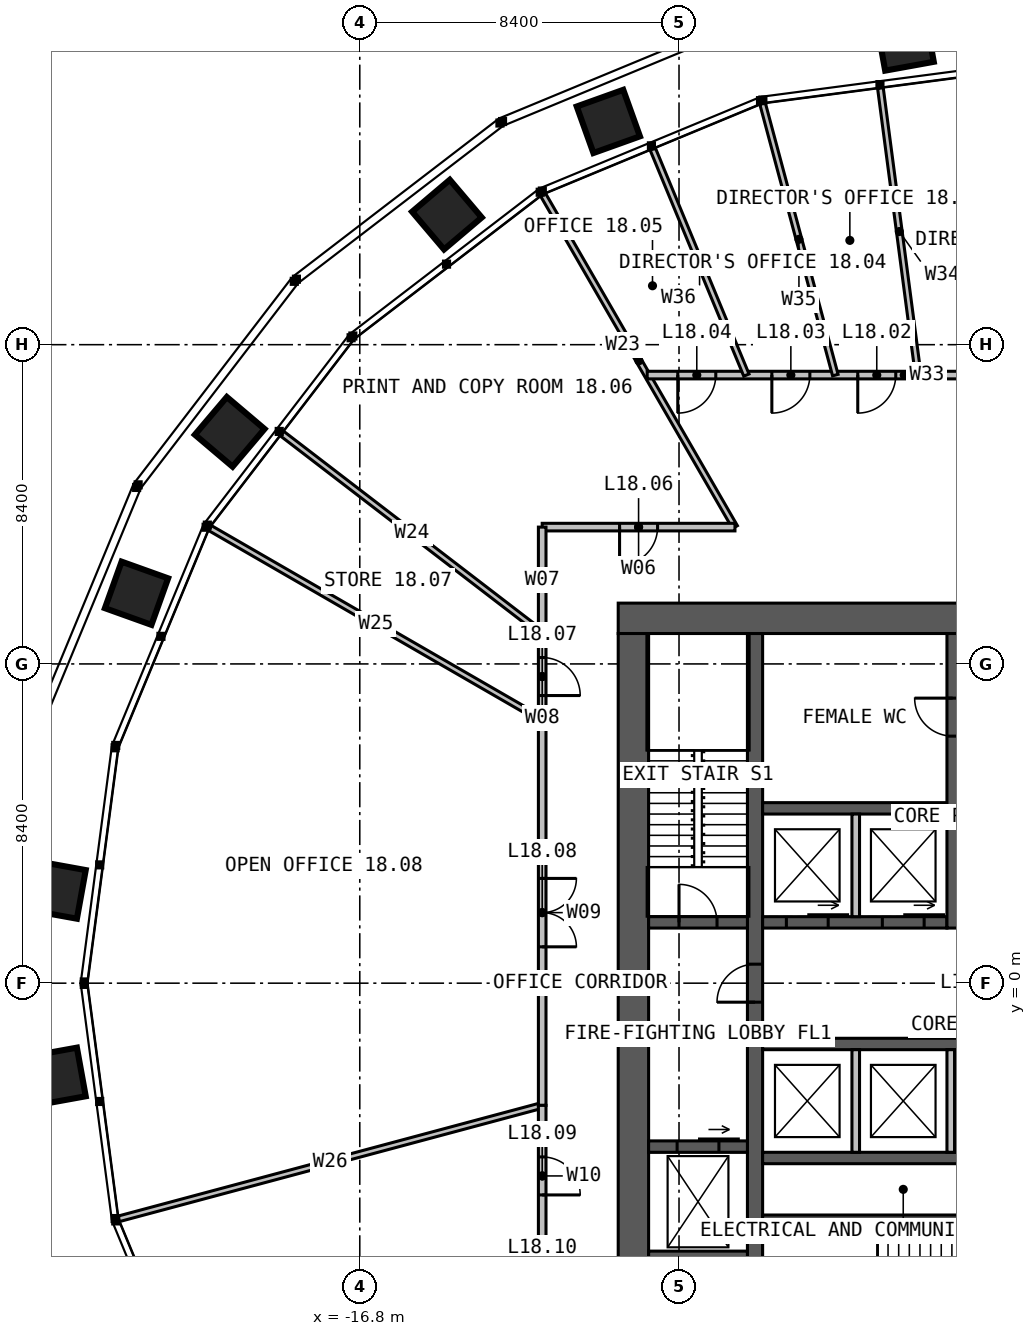
"""IFC4 building model, lengths in metres.
Left out: names, types, materials, properties, quantities, classifications, styles, units other than length and angle.
Written with IfcOpenShell. Run it as: python <this file> out.ifc"""

import sys

from ifc_helpers import new_model, si_unit, direction, frame, frame_2d, origin, place, context, subcontext, project, spatial, rectangle, extrude, element, fill, save


model = new_model("IFC4")
c1 = context("Model", 3, precision=1e-05, world=origin(), true_north=direction((0.0, 1.0)))
c2 = subcontext(c1, "Body", "Model", "MODEL_VIEW")
j1 = project(units=[si_unit("LENGTHUNIT", "METRE"), si_unit("PLANEANGLEUNIT", "RADIAN")], contexts=[c1])
p1 = place(None, origin())
s1 = spatial("IfcSite", under=j1, at=p1, CompositionType="ELEMENT")
p2 = place(p1, origin())
s2 = spatial("IfcBuilding", under=s1, at=p2, CompositionType="ELEMENT")
p3 = place(p2, frame((0.0, 0.0, 77.0)))
s3 = spatial("IfcBuildingStorey", under=s2, at=p3, CompositionType="ELEMENT", Elevation=77.0)
p4 = place(p3, frame((-10.0, 9.6, 0.0), z_axis=(0.0, 0.0, 1.0), x_axis=(1.0, 0.0, 0.0)))
e1 = element("IfcWall", 1, at=p4, inside=s3, PredefinedType="SOLIDWALL", context=c2, shape_type="SweptSolid", body=[
    extrude(rectangle(XDim=20.0, YDim=0.8, at=frame_2d((10.0, 0.0))), origin(), (0.0, 0.0, 1.0), 4.0),
])
p5 = place(p4, frame((9.4, 0.0, 0.0)))
e2 = element("IfcOpeningElement", 2, at=p5, cuts=e1, PredefinedType="OPENING", context=c2, shape_type="SweptSolid", body=[
    extrude(rectangle(XDim=1.2, YDim=2.2, at=frame_2d((0.6, 1.1))), frame((0.0, 0.41, 0.0), z_axis=(0.0, -1.0, 0.0), x_axis=(1.0, 0.0, 0.0)), (0.0, 0.0, 1.0), 0.82),
])
p6 = place(p3, frame((-9.6, 9.2, 0.0), z_axis=(0.0, 0.0, 1.0), x_axis=(0.0, -1.0, 0.0)))
e3 = element("IfcWall", 3, at=p6, inside=s3, PredefinedType="SOLIDWALL", context=c2, shape_type="SweptSolid", body=[
    extrude(rectangle(XDim=18.4, YDim=0.8, at=frame_2d((9.2, 0.0))), origin(), (0.0, 0.0, 1.0), 4.0),
])
p7 = place(p3, frame((-6.4, -9.2, 0.0), z_axis=(0.0, 0.0, 1.0), x_axis=(0.0, 1.0, 0.0)))
e4 = element("IfcWall", 4, at=p7, inside=s3, PredefinedType="SOLIDWALL", context=c2, shape_type="SweptSolid", body=[
    extrude(rectangle(XDim=18.4, YDim=0.4, at=frame_2d((9.2, 0.0))), origin(), (0.0, 0.0, 1.0), 4.0),
])
p8 = place(p7, frame((8.7, 0.0, 0.0)))
e5 = element("IfcOpeningElement", 5, at=p8, cuts=e4, PredefinedType="OPENING", context=c2, shape_type="SweptSolid", body=[
    extrude(rectangle(XDim=1.0, YDim=2.2, at=frame_2d((0.5, 1.1))), frame((0.0, 0.21, 0.0), z_axis=(0.0, -1.0, 0.0), x_axis=(1.0, 0.0, 0.0)), (0.0, 0.0, 1.0), 0.42),
])
p9 = place(p3, frame((-6.2, 1.6, 0.0), z_axis=(0.0, 0.0, 1.0), x_axis=(1.0, 0.0, 0.0)))
e6 = element("IfcWall", 6, at=p9, inside=s3, PredefinedType="SOLIDWALL", context=c2, shape_type="SweptSolid", body=[
    extrude(rectangle(XDim=4.85, YDim=0.3, at=frame_2d((2.425, 0.0))), origin(), (0.0, 0.0, 1.0), 4.0),
])
p10 = place(p9, frame((0.625, 0.0, 0.0)))
e7 = element("IfcOpeningElement", 7, at=p10, cuts=e6, PredefinedType="OPENING", context=c2, shape_type="SweptSolid", body=[
    extrude(rectangle(XDim=1.1, YDim=2.2, at=frame_2d((0.55, 1.1))), frame((0.0, 0.16, 0.0), z_axis=(0.0, -1.0, 0.0), x_axis=(1.0, 0.0, 0.0)), (0.0, 0.0, 1.0), 0.32),
])
p11 = place(p9, frame((3.15, 0.0, 0.0)))
e8 = element("IfcOpeningElement", 8, at=p11, cuts=e6, PredefinedType="OPENING", context=c2, shape_type="SweptSolid", body=[
    extrude(rectangle(XDim=1.1, YDim=2.2, at=frame_2d((0.55, 1.1))), frame((0.0, 0.16, 0.0), z_axis=(0.0, -1.0, 0.0), x_axis=(1.0, 0.0, 0.0)), (0.0, 0.0, 1.0), 0.32),
])
p12 = place(p3, frame((-6.2, 4.6, 0.0), z_axis=(0.0, 0.0, 1.0), x_axis=(1.0, 0.0, 0.0)))
e9 = element("IfcWall", 9, at=p12, inside=s3, PredefinedType="SOLIDWALL", context=c2, shape_type="SweptSolid", body=[
    extrude(rectangle(XDim=4.85, YDim=0.3, at=frame_2d((2.425, 0.0))), origin(), (0.0, 0.0, 1.0), 4.0),
])
p13 = place(p3, frame((-1.2, 1.45, 0.0), z_axis=(0.0, 0.0, 1.0), x_axis=(0.0, 1.0, 0.0)))
e10 = element("IfcWall", 10, at=p13, inside=s3, PredefinedType="SOLIDWALL", context=c2, shape_type="SweptSolid", body=[
    extrude(rectangle(XDim=7.75, YDim=0.3, at=frame_2d((3.875, 0.0))), origin(), (0.0, 0.0, 1.0), 4.0),
])
p14 = place(p13, frame((5.05, 0.0, 0.0)))
e11 = element("IfcOpeningElement", 11, at=p14, cuts=e10, PredefinedType="OPENING", context=c2, shape_type="SweptSolid", body=[
    extrude(rectangle(XDim=1.0, YDim=2.2, at=frame_2d((0.5, 1.1))), frame((0.0, 0.16, 0.0), z_axis=(0.0, -1.0, 0.0), x_axis=(1.0, 0.0, 0.0)), (0.0, 0.0, 1.0), 0.32),
])
for number, where, z_axis, x_axis in (
    (12, (-6.2, -1.6, 0.0), (0.0, 0.0, 1.0), (1.0, 0.0, 0.0)),
    (13, (-6.2, -4.6, 0.0), (0.0, 0.0, 1.0), (1.0, 0.0, 0.0)),
):
    element("IfcWall", number, at=place(p3, frame(where, z_axis=z_axis, x_axis=x_axis)), inside=s3, PredefinedType="SOLIDWALL", context=c2, shape_type="SweptSolid", body=[
        extrude(rectangle(XDim=7.4, YDim=0.3, at=frame_2d((3.7, 0.0))), origin(), (0.0, 0.0, 1.0), 4.0),
    ])
p15 = place(p3, frame((-6.2, -6.2, 0.0), z_axis=(0.0, 0.0, 1.0), x_axis=(1.0, 0.0, 0.0)))
e14 = element("IfcWall", 14, at=p15, inside=s3, PredefinedType="SOLIDWALL", context=c2, shape_type="SweptSolid", body=[
    extrude(rectangle(XDim=7.4, YDim=0.2, at=frame_2d((3.7, 0.0))), origin(), (0.0, 0.0, 1.0), 4.0),
])
p16 = place(p3, frame((-9.2, 1.6, 0.0), z_axis=(0.0, 0.0, 1.0), x_axis=(1.0, 0.0, 0.0)))
e15 = element("IfcWall", 15, at=p16, inside=s3, PredefinedType="SOLIDWALL", context=c2, shape_type="SweptSolid", body=[
    extrude(rectangle(XDim=2.6, YDim=0.3, at=frame_2d((1.3, 0.0))), origin(), (0.0, 0.0, 1.0), 4.0),
])
p17 = place(p16, frame((0.8, 0.0, 0.0)))
e16 = element("IfcOpeningElement", 16, at=p17, cuts=e15, PredefinedType="OPENING", context=c2, shape_type="SweptSolid", body=[
    extrude(rectangle(XDim=1.0, YDim=2.2, at=frame_2d((0.5, 1.1))), frame((0.0, 0.16, 0.0), z_axis=(0.0, -1.0, 0.0), x_axis=(1.0, 0.0, 0.0)), (0.0, 0.0, 1.0), 0.32),
])
p18 = place(p3, frame((-9.2, -4.3, 0.0), z_axis=(0.0, 0.0, 1.0), x_axis=(1.0, 0.0, 0.0)))
e17 = element("IfcWall", 17, at=p18, inside=s3, PredefinedType="SOLIDWALL", context=c2, shape_type="SweptSolid", body=[
    extrude(rectangle(XDim=2.6, YDim=0.3, at=frame_2d((1.3, 0.0))), origin(), (0.0, 0.0, 1.0), 4.0),
])
p19 = place(p18, frame((0.75, 0.0, 0.0)))
e18 = element("IfcOpeningElement", 18, at=p19, cuts=e17, PredefinedType="OPENING", context=c2, shape_type="SweptSolid", body=[
    extrude(rectangle(XDim=1.1, YDim=2.2, at=frame_2d((0.55, 1.1))), frame((0.0, 0.16, 0.0), z_axis=(0.0, -1.0, 0.0), x_axis=(1.0, 0.0, 0.0)), (0.0, 0.0, 1.0), 0.32),
])
p20 = place(p3, frame((-9.2, -7.2, 0.0), z_axis=(0.0, 0.0, 1.0), x_axis=(1.0, 0.0, 0.0)))
e19 = element("IfcWall", 19, at=p20, inside=s3, PredefinedType="SOLIDWALL", context=c2, shape_type="SweptSolid", body=[
    extrude(rectangle(XDim=2.6, YDim=0.3, at=frame_2d((1.3, 0.0))), origin(), (0.0, 0.0, 1.0), 4.0),
])
for number, where, z_axis, x_axis in (
    (20, (-3.75, 1.75, 0.0), (0.0, 0.0, 1.0), (0.0, 1.0, 0.0)),
    (21, (-3.75, -1.75, 0.0), (0.0, 0.0, 1.0), (0.0, -1.0, 0.0)),
    (22, (-1.25, -1.75, 0.0), (0.0, 0.0, 1.0), (0.0, -1.0, 0.0)),
):
    element("IfcWall", number, at=place(p3, frame(where, z_axis=z_axis, x_axis=x_axis)), inside=s3, PredefinedType="SOLIDWALL", context=c2, shape_type="SweptSolid", body=[
        extrude(rectangle(XDim=2.7, YDim=0.2, at=frame_2d((1.35, 0.0))), origin(), (0.0, 0.0, 1.0), 3.75),
    ])
p21 = place(p3, frame((-6.928, 12.0, 0.0), z_axis=(0.0, 0.0, 1.0), x_axis=(-0.500002673408, 0.866023860286, 0.0)))
e23 = element("IfcWall", 23, at=p21, inside=s3, PredefinedType="PARTITIONING", context=c2, shape_type="SweptSolid", body=[
    extrude(rectangle(XDim=10.106, YDim=0.15, at=frame_2d((5.053, 0.0))), origin(), (0.0, 0.0, 1.0), 2.79),
])
p22 = place(p3, frame((-12.0, 9.208, 0.0), z_axis=(0.0, 0.0, 1.0), x_axis=(-0.793363649613, 0.608747993403, 0.0)))
e24 = element("IfcWall", 24, at=p22, inside=s3, PredefinedType="PARTITIONING", context=c2, shape_type="SweptSolid", body=[
    extrude(rectangle(XDim=8.632, YDim=0.15, at=frame_2d((4.316, 0.0))), origin(), (0.0, 0.0, 1.0), 2.79),
])
p23 = place(p3, frame((-12.0, 6.928, 0.0), z_axis=(0.0, 0.0, 1.0), x_axis=(-0.866023860286, 0.500002673408, 0.0)))
e25 = element("IfcWall", 25, at=p23, inside=s3, PredefinedType="PARTITIONING", context=c2, shape_type="SweptSolid", body=[
    extrude(rectangle(XDim=10.106, YDim=0.15, at=frame_2d((5.053, 0.0))), origin(), (0.0, 0.0, 1.0), 2.79),
])
p24 = place(p3, frame((-12.0, -3.215, 0.0), z_axis=(0.0, 0.0, 1.0), x_axis=(-0.96592415734, -0.258825273624, 0.0)))
e26 = element("IfcWall", 26, at=p24, inside=s3, PredefinedType="PARTITIONING", context=c2, shape_type="SweptSolid", body=[
    extrude(rectangle(XDim=11.539, YDim=0.15, at=frame_2d((5.77, 0.0))), origin(), (0.0, 0.0, 1.0), 2.79),
])
p25 = place(p3, frame((-12.0, -6.928, 0.0), z_axis=(0.0, 0.0, 1.0), x_axis=(-0.866023860286, -0.500002673408, 0.0)))
e27 = element("IfcWall", 27, at=p25, inside=s3, PredefinedType="PARTITIONING", context=c2, shape_type="SweptSolid", body=[
    extrude(rectangle(XDim=10.106, YDim=0.15, at=frame_2d((5.053, 0.0))), origin(), (0.0, 0.0, 1.0), 2.79),
])
p26 = place(p3, frame((4.287, 16.0, 0.0), z_axis=(0.0, 0.0, 1.0), x_axis=(-1.0, 0.0, 0.0)))
e28 = element("IfcWall", 28, at=p26, inside=s3, PredefinedType="PARTITIONING", context=c2, shape_type="SweptSolid", body=[
    extrude(rectangle(XDim=13.525, YDim=0.2, at=frame_2d((6.762, 0.0))), origin(), (0.0, 0.0, 1.0), 3.8),
])
p27 = place(p26, frame((2.697, 0.0, 0.0)))
e29 = element("IfcOpeningElement", 29, at=p27, cuts=e28, PredefinedType="OPENING", context=c2, shape_type="SweptSolid", body=[
    extrude(rectangle(XDim=1.0, YDim=2.2, at=frame_2d((0.5, 1.1))), frame((0.0, 0.11, 0.0), z_axis=(0.0, -1.0, 0.0), x_axis=(1.0, 0.0, 0.0)), (0.0, 0.0, 1.0), 0.22),
])
p28 = place(p26, frame((6.984, 0.0, 0.0)))
e30 = element("IfcOpeningElement", 30, at=p28, cuts=e28, PredefinedType="OPENING", context=c2, shape_type="SweptSolid", body=[
    extrude(rectangle(XDim=1.0, YDim=2.2, at=frame_2d((0.5, 1.1))), frame((0.0, 0.11, 0.0), z_axis=(0.0, -1.0, 0.0), x_axis=(1.0, 0.0, 0.0)), (0.0, 0.0, 1.0), 0.22),
])
p29 = place(p26, frame((9.244, 0.0, 0.0)))
e31 = element("IfcOpeningElement", 31, at=p29, cuts=e28, PredefinedType="OPENING", context=c2, shape_type="SweptSolid", body=[
    extrude(rectangle(XDim=1.0, YDim=2.2, at=frame_2d((0.5, 1.1))), frame((0.0, 0.11, 0.0), z_axis=(0.0, -1.0, 0.0), x_axis=(1.0, 0.0, 0.0)), (0.0, 0.0, 1.0), 0.22),
])
p30 = place(p26, frame((11.72, 0.0, 0.0)))
e32 = element("IfcOpeningElement", 32, at=p30, cuts=e28, PredefinedType="OPENING", context=c2, shape_type="SweptSolid", body=[
    extrude(rectangle(XDim=1.0, YDim=2.2, at=frame_2d((0.5, 1.1))), frame((0.0, 0.11, 0.0), z_axis=(0.0, -1.0, 0.0), x_axis=(1.0, 0.0, 0.0)), (0.0, 0.0, 1.0), 0.22),
])
p31 = place(p3, frame((-2.106, 16.0, 0.0), z_axis=(0.0, 0.0, 1.0), x_axis=(-0.130511705759, 0.991446768445, 0.0)))
e33 = element("IfcWall", 33, at=p31, inside=s3, PredefinedType="PARTITIONING", context=c2, shape_type="SweptSolid", body=[
    extrude(rectangle(XDim=7.619, YDim=0.15, at=frame_2d((3.81, 0.0))), origin(), (0.0, 0.0, 1.0), 2.79),
])
p32 = place(p3, frame((-4.287, 16.0, 0.0), z_axis=(0.0, 0.0, 1.0), x_axis=(-0.258831210147, 0.965922566593, 0.0)))
e34 = element("IfcWall", 34, at=p32, inside=s3, PredefinedType="PARTITIONING", context=c2, shape_type="SweptSolid", body=[
    extrude(rectangle(XDim=7.398, YDim=0.15, at=frame_2d((3.699, 0.0))), origin(), (0.0, 0.0, 1.0), 2.79),
])
p33 = place(p3, frame((-6.627, 16.0, 0.0), z_axis=(0.0, 0.0, 1.0), x_axis=(-0.382692246291, 0.923875881614, 0.0)))
e35 = element("IfcWall", 35, at=p33, inside=s3, PredefinedType="PARTITIONING", context=c2, shape_type="SweptSolid", body=[
    extrude(rectangle(XDim=6.439, YDim=0.15, at=frame_2d((3.219, 0.0))), origin(), (0.0, 0.0, 1.0), 2.79),
])
p34 = place(p3, frame((-6.928, 12.0, 0.0), z_axis=(0.0, 0.0, 1.0), x_axis=(-1.0, 0.0, 0.0)))
e36 = element("IfcWall", 36, at=p34, inside=s3, PredefinedType="PARTITIONING", context=c2, shape_type="SweptSolid", body=[
    extrude(rectangle(XDim=5.072, YDim=0.2, at=frame_2d((2.536, 0.0))), origin(), (0.0, 0.0, 1.0), 3.8),
])
p35 = place(p34, frame((2.036, 0.0, 0.0)))
e37 = element("IfcOpeningElement", 37, at=p35, cuts=e36, PredefinedType="OPENING", context=c2, shape_type="SweptSolid", body=[
    extrude(rectangle(XDim=1.0, YDim=2.2, at=frame_2d((0.5, 1.1))), frame((0.0, 0.11, 0.0), z_axis=(0.0, -1.0, 0.0), x_axis=(1.0, 0.0, 0.0)), (0.0, 0.0, 1.0), 0.22),
])
p36 = place(p3, frame((-12.0, 12.0, 0.0), z_axis=(0.0, 0.0, 1.0), x_axis=(0.0, -1.0, 0.0)))
e38 = element("IfcWall", 38, at=p36, inside=s3, PredefinedType="PARTITIONING", context=c2, shape_type="SweptSolid", body=[
    extrude(rectangle(XDim=2.792, YDim=0.2, at=frame_2d((1.396, 0.0))), origin(), (0.0, 0.0, 1.0), 3.8),
])
p37 = place(p3, frame((-12.0, 9.208, 0.0), z_axis=(0.0, 0.0, 1.0), x_axis=(0.0, -1.0, 0.0)))
e39 = element("IfcWall", 39, at=p37, inside=s3, PredefinedType="PARTITIONING", context=c2, shape_type="SweptSolid", body=[
    extrude(rectangle(XDim=2.28, YDim=0.2, at=frame_2d((1.14, 0.0))), origin(), (0.0, 0.0, 1.0), 3.8),
])
p38 = place(p37, frame((0.64, 0.0, 0.0)))
e40 = element("IfcOpeningElement", 40, at=p38, cuts=e39, PredefinedType="OPENING", context=c2, shape_type="SweptSolid", body=[
    extrude(rectangle(XDim=1.0, YDim=2.2, at=frame_2d((0.5, 1.1))), frame((0.0, 0.11, 0.0), z_axis=(0.0, -1.0, 0.0), x_axis=(1.0, 0.0, 0.0)), (0.0, 0.0, 1.0), 0.22),
])
p39 = place(p3, frame((-12.0, 6.928, 0.0), z_axis=(0.0, 0.0, 1.0), x_axis=(0.0, -1.0, 0.0)))
e41 = element("IfcWall", 41, at=p39, inside=s3, PredefinedType="PARTITIONING", context=c2, shape_type="SweptSolid", body=[
    extrude(rectangle(XDim=10.144, YDim=0.2, at=frame_2d((5.072, 0.0))), origin(), (0.0, 0.0, 1.0), 3.8),
])
p40 = place(p39, frame((4.172, 0.0, 0.0)))
e42 = element("IfcOpeningElement", 42, at=p40, cuts=e41, PredefinedType="OPENING", context=c2, shape_type="SweptSolid", body=[
    extrude(rectangle(XDim=1.8, YDim=2.2, at=frame_2d((0.9, 1.1))), frame((0.0, 0.11, 0.0), z_axis=(0.0, -1.0, 0.0), x_axis=(1.0, 0.0, 0.0)), (0.0, 0.0, 1.0), 0.22),
])
p41 = place(p3, frame((-12.0, -3.215, 0.0), z_axis=(0.0, 0.0, 1.0), x_axis=(0.0, -1.0, 0.0)))
e43 = element("IfcWall", 43, at=p41, inside=s3, PredefinedType="PARTITIONING", context=c2, shape_type="SweptSolid", body=[
    extrude(rectangle(XDim=3.713, YDim=0.2, at=frame_2d((1.856, 0.0))), origin(), (0.0, 0.0, 1.0), 3.8),
])
p42 = place(p41, frame((1.356, 0.0, 0.0)))
e44 = element("IfcOpeningElement", 44, at=p42, cuts=e43, PredefinedType="OPENING", context=c2, shape_type="SweptSolid", body=[
    extrude(rectangle(XDim=1.0, YDim=2.2, at=frame_2d((0.5, 1.1))), frame((0.0, 0.11, 0.0), z_axis=(0.0, -1.0, 0.0), x_axis=(1.0, 0.0, 0.0)), (0.0, 0.0, 1.0), 0.22),
])
p43 = place(p3, frame((-12.0, -6.928, 0.0), z_axis=(0.0, 0.0, 1.0), x_axis=(0.0, -1.0, 0.0)))
e45 = element("IfcWall", 45, at=p43, inside=s3, PredefinedType="PARTITIONING", context=c2, shape_type="SweptSolid", body=[
    extrude(rectangle(XDim=2.28, YDim=0.2, at=frame_2d((1.14, 0.0))), origin(), (0.0, 0.0, 1.0), 3.8),
])
p44 = place(p43, frame((0.64, 0.0, 0.0)))
e46 = element("IfcOpeningElement", 46, at=p44, cuts=e45, PredefinedType="OPENING", context=c2, shape_type="SweptSolid", body=[
    extrude(rectangle(XDim=1.0, YDim=2.2, at=frame_2d((0.5, 1.1))), frame((0.0, 0.11, 0.0), z_axis=(0.0, -1.0, 0.0), x_axis=(1.0, 0.0, 0.0)), (0.0, 0.0, 1.0), 0.22),
])
p45 = place(p8, origin())
e47 = element("IfcDoor", 47, at=p45, inside=s3, OperationType="SINGLE_SWING_LEFT", PredefinedType="DOOR", context=c2, shape_type="SweptSolid", body=[
    extrude(rectangle(XDim=1.0, YDim=2.2, at=frame_2d((0.5, 1.1))), frame((0.0, 0.025, 0.0), z_axis=(0.0, -1.0, 0.0), x_axis=(1.0, 0.0, 0.0)), (0.0, 0.0, 1.0), 0.05),
])
fill(e5, e47)
p46 = place(p17, origin())
e48 = element("IfcDoor", 48, at=p46, inside=s3, OperationType="SINGLE_SWING_LEFT", PredefinedType="DOOR", context=c2, shape_type="SweptSolid", body=[
    extrude(rectangle(XDim=1.0, YDim=2.2, at=frame_2d((0.5, 1.1))), frame((0.0, 0.025, 0.0), z_axis=(0.0, -1.0, 0.0), x_axis=(1.0, 0.0, 0.0)), (0.0, 0.0, 1.0), 0.05),
])
fill(e16, e48)
p47 = place(p14, origin())
e49 = element("IfcDoor", 49, at=p47, inside=s3, OperationType="SINGLE_SWING_RIGHT", PredefinedType="DOOR", context=c2, shape_type="SweptSolid", body=[
    extrude(rectangle(XDim=1.0, YDim=2.2, at=frame_2d((0.5, 1.1))), frame((0.0, 0.025, 0.0), z_axis=(0.0, -1.0, 0.0), x_axis=(1.0, 0.0, 0.0)), (0.0, 0.0, 1.0), 0.05),
])
fill(e11, e49)
p48 = place(p10, origin())
e50 = element("IfcDoor", 50, at=p48, inside=s3, OperationType="SLIDING_TO_LEFT", PredefinedType="DOOR", context=c2, shape_type="SweptSolid", body=[
    extrude(rectangle(XDim=1.1, YDim=2.2, at=frame_2d((0.55, 1.1))), frame((0.0, 0.025, 0.0), z_axis=(0.0, -1.0, 0.0), x_axis=(1.0, 0.0, 0.0)), (0.0, 0.0, 1.0), 0.05),
])
fill(e7, e50)
p49 = place(p11, origin())
e51 = element("IfcDoor", 51, at=p49, inside=s3, OperationType="SLIDING_TO_LEFT", PredefinedType="DOOR", context=c2, shape_type="SweptSolid", body=[
    extrude(rectangle(XDim=1.1, YDim=2.2, at=frame_2d((0.55, 1.1))), frame((0.0, 0.025, 0.0), z_axis=(0.0, -1.0, 0.0), x_axis=(1.0, 0.0, 0.0)), (0.0, 0.0, 1.0), 0.05),
])
fill(e8, e51)
p50 = place(p19, origin())
e52 = element("IfcDoor", 52, at=p50, inside=s3, OperationType="SLIDING_TO_LEFT", PredefinedType="DOOR", context=c2, shape_type="SweptSolid", body=[
    extrude(rectangle(XDim=1.1, YDim=2.2, at=frame_2d((0.55, 1.1))), frame((0.0, 0.025, 0.0), z_axis=(0.0, -1.0, 0.0), x_axis=(1.0, 0.0, 0.0)), (0.0, 0.0, 1.0), 0.05),
])
fill(e18, e52)
p51 = place(p28, origin())
e53 = element("IfcDoor", 53, at=p51, inside=s3, OperationType="SINGLE_SWING_RIGHT", PredefinedType="DOOR", context=c2, shape_type="SweptSolid", body=[
    extrude(rectangle(XDim=1.0, YDim=2.2, at=frame_2d((0.5, 1.1))), frame((0.0, 0.025, 0.0), z_axis=(0.0, -1.0, 0.0), x_axis=(1.0, 0.0, 0.0)), (0.0, 0.0, 1.0), 0.05),
])
fill(e30, e53)
p52 = place(p29, origin())
e54 = element("IfcDoor", 54, at=p52, inside=s3, OperationType="SINGLE_SWING_RIGHT", PredefinedType="DOOR", context=c2, shape_type="SweptSolid", body=[
    extrude(rectangle(XDim=1.0, YDim=2.2, at=frame_2d((0.5, 1.1))), frame((0.0, 0.025, 0.0), z_axis=(0.0, -1.0, 0.0), x_axis=(1.0, 0.0, 0.0)), (0.0, 0.0, 1.0), 0.05),
])
fill(e31, e54)
p53 = place(p30, origin())
e55 = element("IfcDoor", 55, at=p53, inside=s3, OperationType="SINGLE_SWING_RIGHT", PredefinedType="DOOR", context=c2, shape_type="SweptSolid", body=[
    extrude(rectangle(XDim=1.0, YDim=2.2, at=frame_2d((0.5, 1.1))), frame((0.0, 0.025, 0.0), z_axis=(0.0, -1.0, 0.0), x_axis=(1.0, 0.0, 0.0)), (0.0, 0.0, 1.0), 0.05),
])
fill(e32, e55)
p54 = place(p35, origin())
e56 = element("IfcDoor", 56, at=p54, inside=s3, OperationType="SINGLE_SWING_RIGHT", PredefinedType="DOOR", context=c2, shape_type="SweptSolid", body=[
    extrude(rectangle(XDim=1.0, YDim=2.2, at=frame_2d((0.5, 1.1))), frame((0.0, 0.025, 0.0), z_axis=(0.0, -1.0, 0.0), x_axis=(1.0, 0.0, 0.0)), (0.0, 0.0, 1.0), 0.05),
])
fill(e37, e56)
p55 = place(p38, origin())
e57 = element("IfcDoor", 57, at=p55, inside=s3, OperationType="SINGLE_SWING_RIGHT", PredefinedType="DOOR", context=c2, shape_type="SweptSolid", body=[
    extrude(rectangle(XDim=1.0, YDim=2.2, at=frame_2d((0.5, 1.1))), frame((0.0, 0.025, 0.0), z_axis=(0.0, -1.0, 0.0), x_axis=(1.0, 0.0, 0.0)), (0.0, 0.0, 1.0), 0.05),
])
fill(e40, e57)
p56 = place(p40, origin())
e58 = element("IfcDoor", 58, at=p56, inside=s3, OperationType="DOUBLE_DOOR_SINGLE_SWING", PredefinedType="DOOR", context=c2, shape_type="SweptSolid", body=[
    extrude(rectangle(XDim=1.8, YDim=2.2, at=frame_2d((0.9, 1.1))), frame((0.0, 0.025, 0.0), z_axis=(0.0, -1.0, 0.0), x_axis=(1.0, 0.0, 0.0)), (0.0, 0.0, 1.0), 0.05),
])
fill(e42, e58)
p57 = place(p42, origin())
e59 = element("IfcDoor", 59, at=p57, inside=s3, OperationType="SINGLE_SWING_RIGHT", PredefinedType="DOOR", context=c2, shape_type="SweptSolid", body=[
    extrude(rectangle(XDim=1.0, YDim=2.2, at=frame_2d((0.5, 1.1))), frame((0.0, 0.025, 0.0), z_axis=(0.0, -1.0, 0.0), x_axis=(1.0, 0.0, 0.0)), (0.0, 0.0, 1.0), 0.05),
])
fill(e44, e59)
save(model, sys.argv[1])
